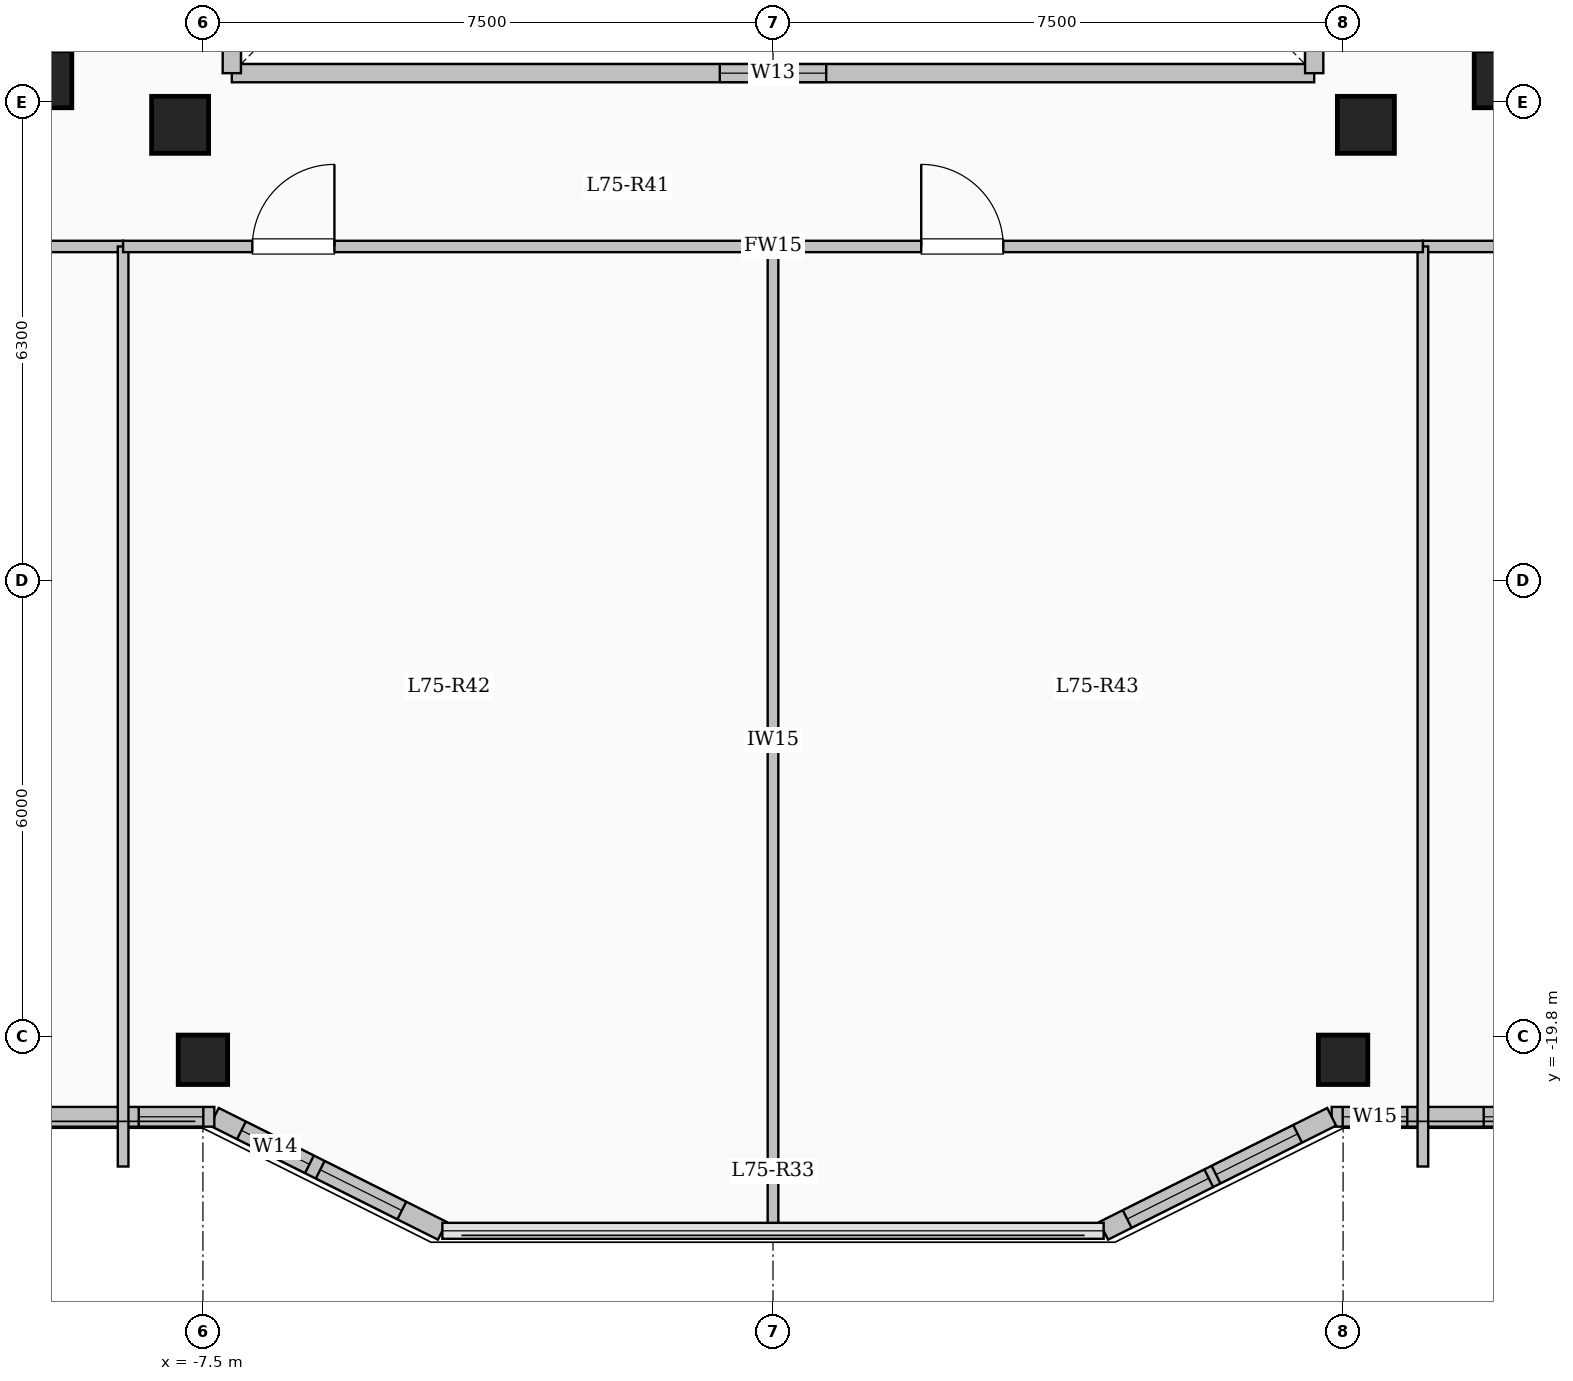
"""IFC4 building model, lengths in metres.
Left out: names, types, materials, properties, quantities, classifications, styles, units other than length and angle.
Written with IfcOpenShell. Run it as: python <this file> out.ifc"""

import sys

from ifc_helpers import new_model, si_unit, direction, frame, frame_2d, origin, origin_2d, place, context, subcontext, project, spatial, rectangle, extrude, element, fill, save


model = new_model("IFC4")
c1 = context("Model", 3, precision=1e-05, world=origin(), true_north=direction((0.0, 1.0)))
c2 = subcontext(c1, "Body", "Model", "MODEL_VIEW")
j1 = project(units=[si_unit("LENGTHUNIT", "METRE"), si_unit("PLANEANGLEUNIT", "RADIAN")], contexts=[c1])
p1 = place(None, origin())
s1 = spatial("IfcSite", under=j1, at=p1, CompositionType="ELEMENT")
p2 = place(p1, origin())
s2 = spatial("IfcBuilding", under=s1, at=p2, CompositionType="ELEMENT")
p3 = place(p2, frame((0.0, 0.0, 276.3)))
s3 = spatial("IfcBuildingStorey", under=s2, at=p3, CompositionType="ELEMENT", Elevation=276.3)
for number, where, z_axis, x_axis in (
    (1, (-7.8, -7.8, 0.0), (0.0, 0.0, 1.0), (1.0, 0.0, 0.0)),
    (2, (7.8, -7.8, 0.0), (0.0, 0.0, 1.0), (1.0, 0.0, 0.0)),
    (3, (-9.6, -7.2, 0.0), (0.0, 0.0, 1.0), (1.0, 0.0, 0.0)),
    (4, (9.6, -7.2, 0.0), (0.0, 0.0, 1.0), (1.0, 0.0, 0.0)),
):
    element("IfcColumn", number, at=place(p3, frame(where, z_axis=z_axis, x_axis=x_axis)), inside=s3, PredefinedType="COLUMN", context=c2, shape_type="SweptSolid", body=[
        extrude(rectangle(XDim=0.75, YDim=0.75, at=origin_2d()), origin(), (0.0, 0.0, 1.0), 5.25),
    ])
for number, where, z_axis, x_axis in (
    (5, (-7.5, -20.1, 0.0), (0.0, 0.0, 1.0), (1.0, 0.0, 0.0)),
    (6, (7.5, -20.1, 0.0), (0.0, 0.0, 1.0), (1.0, 0.0, 0.0)),
):
    element("IfcColumn", number, at=place(p3, frame(where, z_axis=z_axis, x_axis=x_axis)), inside=s3, PredefinedType="COLUMN", context=c2, shape_type="SweptSolid", body=[
        extrude(rectangle(XDim=0.65, YDim=0.65, at=origin_2d()), origin(), (0.0, 0.0, 1.0), 5.25),
    ])
p4 = place(p3, frame((-7.12, -7.12, 0.0), z_axis=(0.0, 0.0, 1.0), x_axis=(1.0, 0.0, 0.0)))
e7 = element("IfcWall", 7, at=p4, inside=s3, PredefinedType="SOLIDWALL", context=c2, shape_type="SweptSolid", body=[
    extrude(rectangle(XDim=14.24, YDim=0.24, at=frame_2d((7.12, 0.0))), origin(), (0.0, 0.0, 1.0), 4.95),
])
p5 = place(p4, frame((6.42, 0.0, 0.95)))
e8 = element("IfcOpeningElement", 8, at=p5, cuts=e7, PredefinedType="OPENING", context=c2, shape_type="SweptSolid", body=[
    extrude(rectangle(XDim=1.4, YDim=1.5, at=frame_2d((0.7, 0.75))), frame((0.0, 0.13, 0.0), z_axis=(0.0, -1.0, 0.0), x_axis=(1.0, 0.0, 0.0)), (0.0, 0.0, 1.0), 0.26),
])
p6 = place(p3, frame((7.12, -7.12, 0.0), z_axis=(0.0, 0.0, 1.0), x_axis=(0.0, 1.0, 0.0)))
e9 = element("IfcWall", 9, at=p6, inside=s3, PredefinedType="SOLIDWALL", context=c2, shape_type="SweptSolid", body=[
    extrude(rectangle(XDim=14.24, YDim=0.24, at=frame_2d((7.12, 0.0))), origin(), (0.0, 0.0, 1.0), 4.95),
])
p7 = place(p6, frame((6.42, 0.0, 0.95)))
e10 = element("IfcOpeningElement", 10, at=p7, cuts=e9, PredefinedType="OPENING", context=c2, shape_type="SweptSolid", body=[
    extrude(rectangle(XDim=1.4, YDim=1.5, at=frame_2d((0.7, 0.75))), frame((0.0, 0.13, 0.0), z_axis=(0.0, -1.0, 0.0), x_axis=(1.0, 0.0, 0.0)), (0.0, 0.0, 1.0), 0.26),
])
p8 = place(p3, frame((-7.12, 7.12, 0.0), z_axis=(0.0, 0.0, 1.0), x_axis=(0.0, -1.0, 0.0)))
e11 = element("IfcWall", 11, at=p8, inside=s3, PredefinedType="SOLIDWALL", context=c2, shape_type="SweptSolid", body=[
    extrude(rectangle(XDim=14.24, YDim=0.24, at=frame_2d((7.12, 0.0))), origin(), (0.0, 0.0, 1.0), 4.95),
])
p9 = place(p8, frame((6.42, 0.0, 0.95)))
e12 = element("IfcOpeningElement", 12, at=p9, cuts=e11, PredefinedType="OPENING", context=c2, shape_type="SweptSolid", body=[
    extrude(rectangle(XDim=1.4, YDim=1.5, at=frame_2d((0.7, 0.75))), frame((0.0, 0.13, 0.0), z_axis=(0.0, -1.0, 0.0), x_axis=(1.0, 0.0, 0.0)), (0.0, 0.0, 1.0), 0.26),
])
p10 = place(p3, frame((17.85, -20.85, 0.0), z_axis=(0.0, 0.0, 1.0), x_axis=(-1.0, 0.0, 0.0)))
e13 = element("IfcWall", 13, at=p10, inside=s3, PredefinedType="SOLIDWALL", context=c2, shape_type="SweptSolid", body=[
    extrude(rectangle(XDim=10.5, YDim=0.26, at=frame_2d((5.25, 0.0))), origin(), (0.0, 0.0, 1.0), 4.95),
])
p11 = place(p10, frame((1.55, 0.0, 0.85)))
e14 = element("IfcOpeningElement", 14, at=p11, cuts=e13, PredefinedType="OPENING", context=c2, shape_type="SweptSolid", body=[
    extrude(rectangle(XDim=2.3, YDim=2.2, at=frame_2d((1.15, 1.1))), frame((0.0, 0.14, 0.0), z_axis=(0.0, -1.0, 0.0), x_axis=(1.0, 0.0, 0.0)), (0.0, 0.0, 1.0), 0.28),
])
p12 = place(p10, frame((6.2, 0.0, 0.85)))
e15 = element("IfcOpeningElement", 15, at=p12, cuts=e13, PredefinedType="OPENING", context=c2, shape_type="SweptSolid", body=[
    extrude(rectangle(XDim=2.3, YDim=2.2, at=frame_2d((1.15, 1.1))), frame((0.0, 0.14, 0.0), z_axis=(0.0, -1.0, 0.0), x_axis=(1.0, 0.0, 0.0)), (0.0, 0.0, 1.0), 0.28),
])
p13 = place(p10, frame((9.505, 0.0, 0.95)))
e16 = element("IfcOpeningElement", 16, at=p13, cuts=e13, PredefinedType="OPENING", context=c2, shape_type="SweptSolid", body=[
    extrude(rectangle(XDim=0.85, YDim=1.5, at=frame_2d((0.425, 0.75))), frame((0.0, 0.14, 0.0), z_axis=(0.0, -1.0, 0.0), x_axis=(1.0, 0.0, 0.0)), (0.0, 0.0, 1.0), 0.28),
])
p14 = place(p3, frame((7.35, -20.85, 0.0), z_axis=(0.0, 0.0, 1.0), x_axis=(-0.894427191, -0.4472135955, 0.0)))
e17 = element("IfcWall", 17, at=p14, inside=s3, PredefinedType="SOLIDWALL", context=c2, shape_type="SweptSolid", body=[
    extrude(rectangle(XDim=3.354, YDim=0.26, at=frame_2d((1.677, 0.0))), origin(), (0.0, 0.0, 1.0), 4.95),
])
p15 = place(p14, frame((0.501, 0.0, 0.95)))
e18 = element("IfcOpeningElement", 18, at=p15, cuts=e17, PredefinedType="OPENING", context=c2, shape_type="SweptSolid", body=[
    extrude(rectangle(XDim=1.2, YDim=1.5, at=frame_2d((0.6, 0.75))), frame((0.0, 0.14, 0.0), z_axis=(0.0, -1.0, 0.0), x_axis=(1.0, 0.0, 0.0)), (0.0, 0.0, 1.0), 0.28),
])
p16 = place(p14, frame((1.808, 0.0, 0.95)))
e19 = element("IfcOpeningElement", 19, at=p16, cuts=e17, PredefinedType="OPENING", context=c2, shape_type="SweptSolid", body=[
    extrude(rectangle(XDim=1.2, YDim=1.5, at=frame_2d((0.6, 0.75))), frame((0.0, 0.14, 0.0), z_axis=(0.0, -1.0, 0.0), x_axis=(1.0, 0.0, 0.0)), (0.0, 0.0, 1.0), 0.28),
])
p17 = place(p3, frame((-4.35, -22.35, 0.0), z_axis=(0.0, 0.0, 1.0), x_axis=(-0.894427191, 0.4472135955, 0.0)))
e20 = element("IfcWall", 20, at=p17, inside=s3, PredefinedType="SOLIDWALL", context=c2, shape_type="SweptSolid", body=[
    extrude(rectangle(XDim=3.354, YDim=0.26, at=frame_2d((1.677, 0.0))), origin(), (0.0, 0.0, 1.0), 4.95),
])
p18 = place(p17, frame((0.596, 0.0, 0.95)))
e21 = element("IfcOpeningElement", 21, at=p18, cuts=e20, PredefinedType="OPENING", context=c2, shape_type="SweptSolid", body=[
    extrude(rectangle(XDim=1.2, YDim=1.5, at=frame_2d((0.6, 0.75))), frame((0.0, 0.14, 0.0), z_axis=(0.0, -1.0, 0.0), x_axis=(1.0, 0.0, 0.0)), (0.0, 0.0, 1.0), 0.28),
])
p19 = place(p17, frame((1.955, 0.0, 0.95)))
e22 = element("IfcOpeningElement", 22, at=p19, cuts=e20, PredefinedType="OPENING", context=c2, shape_type="SweptSolid", body=[
    extrude(rectangle(XDim=1.0, YDim=1.5, at=frame_2d((0.5, 0.75))), frame((0.0, 0.14, 0.0), z_axis=(0.0, -1.0, 0.0), x_axis=(1.0, 0.0, 0.0)), (0.0, 0.0, 1.0), 0.28),
])
p20 = place(p3, frame((-7.35, -20.85, 0.0), z_axis=(0.0, 0.0, 1.0), x_axis=(-1.0, 0.0, 0.0)))
e23 = element("IfcWall", 23, at=p20, inside=s3, PredefinedType="SOLIDWALL", context=c2, shape_type="SweptSolid", body=[
    extrude(rectangle(XDim=10.5, YDim=0.26, at=frame_2d((5.25, 0.0))), origin(), (0.0, 0.0, 1.0), 4.95),
])
p21 = place(p20, frame((0.145, 0.0, 0.95)))
e24 = element("IfcOpeningElement", 24, at=p21, cuts=e23, PredefinedType="OPENING", context=c2, shape_type="SweptSolid", body=[
    extrude(rectangle(XDim=0.85, YDim=1.5, at=frame_2d((0.425, 0.75))), frame((0.0, 0.14, 0.0), z_axis=(0.0, -1.0, 0.0), x_axis=(1.0, 0.0, 0.0)), (0.0, 0.0, 1.0), 0.28),
])
p22 = place(p20, frame((2.65, 0.0, 0.85)))
e25 = element("IfcOpeningElement", 25, at=p22, cuts=e23, PredefinedType="OPENING", context=c2, shape_type="SweptSolid", body=[
    extrude(rectangle(XDim=2.3, YDim=2.2, at=frame_2d((1.15, 1.1))), frame((0.0, 0.14, 0.0), z_axis=(0.0, -1.0, 0.0), x_axis=(1.0, 0.0, 0.0)), (0.0, 0.0, 1.0), 0.28),
])
p23 = place(p20, frame((7.275, 0.0, 0.85)))
e26 = element("IfcOpeningElement", 26, at=p23, cuts=e23, PredefinedType="OPENING", context=c2, shape_type="SweptSolid", body=[
    extrude(rectangle(XDim=2.3, YDim=2.2, at=frame_2d((1.15, 1.1))), frame((0.0, 0.14, 0.0), z_axis=(0.0, -1.0, 0.0), x_axis=(1.0, 0.0, 0.0)), (0.0, 0.0, 1.0), 0.28),
])
p24 = place(p3, frame((-17.75, -9.4, 0.0), z_axis=(0.0, 0.0, 1.0), x_axis=(1.0, 0.0, 0.0)))
e27 = element("IfcWall", 27, at=p24, inside=s3, PredefinedType="PARTITIONING", context=c2, shape_type="SweptSolid", body=[
    extrude(rectangle(XDim=9.2, YDim=0.15, at=frame_2d((4.6, 0.0))), origin(), (0.0, 0.0, 1.0), 4.95),
])
p25 = place(p24, frame((1.1, 0.0, 0.0)))
e28 = element("IfcOpeningElement", 28, at=p25, cuts=e27, PredefinedType="OPENING", context=c2, shape_type="SweptSolid", body=[
    extrude(rectangle(XDim=1.08, YDim=2.15, at=frame_2d((0.54, 1.075))), frame((0.0, 0.085, 0.0), z_axis=(0.0, -1.0, 0.0), x_axis=(1.0, 0.0, 0.0)), (0.0, 0.0, 1.0), 0.17),
])
p26 = place(p24, frame((4.926, 0.0, 0.0)))
e29 = element("IfcOpeningElement", 29, at=p26, cuts=e27, PredefinedType="OPENING", context=c2, shape_type="SweptSolid", body=[
    extrude(rectangle(XDim=1.08, YDim=2.15, at=frame_2d((0.54, 1.075))), frame((0.0, 0.085, 0.0), z_axis=(0.0, -1.0, 0.0), x_axis=(1.0, 0.0, 0.0)), (0.0, 0.0, 1.0), 0.17),
])
p27 = place(p3, frame((8.55, -9.4, 0.0), z_axis=(0.0, 0.0, 1.0), x_axis=(1.0, 0.0, 0.0)))
e30 = element("IfcWall", 30, at=p27, inside=s3, PredefinedType="PARTITIONING", context=c2, shape_type="SweptSolid", body=[
    extrude(rectangle(XDim=9.2, YDim=0.15, at=frame_2d((4.6, 0.0))), origin(), (0.0, 0.0, 1.0), 4.95),
])
p28 = place(p27, frame((1.1, 0.0, 0.0)))
e31 = element("IfcOpeningElement", 31, at=p28, cuts=e30, PredefinedType="OPENING", context=c2, shape_type="SweptSolid", body=[
    extrude(rectangle(XDim=1.08, YDim=2.15, at=frame_2d((0.54, 1.075))), frame((0.0, 0.085, 0.0), z_axis=(0.0, -1.0, 0.0), x_axis=(1.0, 0.0, 0.0)), (0.0, 0.0, 1.0), 0.17),
])
p29 = place(p27, frame((4.893, 0.0, 0.0)))
e32 = element("IfcOpeningElement", 32, at=p29, cuts=e30, PredefinedType="OPENING", context=c2, shape_type="SweptSolid", body=[
    extrude(rectangle(XDim=1.2, YDim=2.15, at=frame_2d((0.6, 1.075))), frame((0.0, 0.085, 0.0), z_axis=(0.0, -1.0, 0.0), x_axis=(1.0, 0.0, 0.0)), (0.0, 0.0, 1.0), 0.17),
])
for number, where, z_axis, x_axis in (
    (33, (-8.55, -21.504, 0.0), (0.0, 0.0, 1.0), (0.0, 1.0, 0.0)),
    (34, (8.55, -21.504, 0.0), (0.0, 0.0, 1.0), (0.0, 1.0, 0.0)),
):
    element("IfcWall", number, at=place(p3, frame(where, z_axis=z_axis, x_axis=x_axis)), inside=s3, PredefinedType="PARTITIONING", context=c2, shape_type="SweptSolid", body=[
        extrude(rectangle(XDim=12.104, YDim=0.14, at=frame_2d((6.052, 0.0))), origin(), (0.0, 0.0, 1.0), 4.95),
    ])
p30 = place(p3, frame((-8.55, -9.4, 0.0), z_axis=(0.0, 0.0, 1.0), x_axis=(1.0, 0.0, 0.0)))
e35 = element("IfcWall", 35, at=p30, inside=s3, PredefinedType="PARTITIONING", context=c2, shape_type="SweptSolid", body=[
    extrude(rectangle(XDim=17.1, YDim=0.15, at=frame_2d((8.55, 0.0))), origin(), (0.0, 0.0, 1.0), 4.95),
])
p31 = place(p30, frame((1.7, 0.0, 0.0)))
e36 = element("IfcOpeningElement", 36, at=p31, cuts=e35, PredefinedType="OPENING", context=c2, shape_type="SweptSolid", body=[
    extrude(rectangle(XDim=1.08, YDim=2.15, at=frame_2d((0.54, 1.075))), frame((0.0, 0.085, 0.0), z_axis=(0.0, -1.0, 0.0), x_axis=(1.0, 0.0, 0.0)), (0.0, 0.0, 1.0), 0.17),
])
p32 = place(p30, frame((10.5, 0.0, 0.0)))
e37 = element("IfcOpeningElement", 37, at=p32, cuts=e35, PredefinedType="OPENING", context=c2, shape_type="SweptSolid", body=[
    extrude(rectangle(XDim=1.08, YDim=2.15, at=frame_2d((0.54, 1.075))), frame((0.0, 0.085, 0.0), z_axis=(0.0, -1.0, 0.0), x_axis=(1.0, 0.0, 0.0)), (0.0, 0.0, 1.0), 0.17),
])
p33 = place(p3, frame((0.0, -22.38, 0.0), z_axis=(0.0, 0.0, 1.0), x_axis=(0.0, 1.0, 0.0)))
e38 = element("IfcWall", 38, at=p33, inside=s3, PredefinedType="PARTITIONING", context=c2, shape_type="SweptSolid", body=[
    extrude(rectangle(XDim=12.98, YDim=0.14, at=frame_2d((6.49, 0.0))), origin(), (0.0, 0.0, 1.0), 4.95),
])
p34 = place(p5, origin())
e39 = element("IfcWindow", 39, at=p34, inside=s3, PartitioningType="SINGLE_PANEL", PredefinedType="WINDOW", context=c2, shape_type="SweptSolid", body=[
    extrude(rectangle(XDim=1.4, YDim=1.5, at=frame_2d((0.7, 0.75))), frame((0.0, 0.03, 0.0), z_axis=(0.0, -1.0, 0.0), x_axis=(1.0, 0.0, 0.0)), (0.0, 0.0, 1.0), 0.06),
])
fill(e8, e39)
p35 = place(p12, origin())
e40 = element("IfcWindow", 40, at=p35, inside=s3, PartitioningType="SINGLE_PANEL", PredefinedType="WINDOW", context=c2, shape_type="SweptSolid", body=[
    extrude(rectangle(XDim=2.3, YDim=2.2, at=frame_2d((1.15, 1.1))), frame((0.0, 0.03, 0.0), z_axis=(0.0, -1.0, 0.0), x_axis=(1.0, 0.0, 0.0)), (0.0, 0.0, 1.0), 0.06),
])
fill(e15, e40)
p36 = place(p13, origin())
e41 = element("IfcWindow", 41, at=p36, inside=s3, PartitioningType="SINGLE_PANEL", PredefinedType="WINDOW", context=c2, shape_type="SweptSolid", body=[
    extrude(rectangle(XDim=0.85, YDim=1.5, at=frame_2d((0.425, 0.75))), frame((0.0, 0.03, 0.0), z_axis=(0.0, -1.0, 0.0), x_axis=(1.0, 0.0, 0.0)), (0.0, 0.0, 1.0), 0.06),
])
fill(e16, e41)
p37 = place(p15, origin())
e42 = element("IfcWindow", 42, at=p37, inside=s3, PartitioningType="SINGLE_PANEL", PredefinedType="WINDOW", context=c2, shape_type="SweptSolid", body=[
    extrude(rectangle(XDim=1.2, YDim=1.5, at=frame_2d((0.6, 0.75))), frame((0.0, 0.03, 0.0), z_axis=(0.0, -1.0, 0.0), x_axis=(1.0, 0.0, 0.0)), (0.0, 0.0, 1.0), 0.06),
])
fill(e18, e42)
p38 = place(p16, origin())
e43 = element("IfcWindow", 43, at=p38, inside=s3, PartitioningType="SINGLE_PANEL", PredefinedType="WINDOW", context=c2, shape_type="SweptSolid", body=[
    extrude(rectangle(XDim=1.2, YDim=1.5, at=frame_2d((0.6, 0.75))), frame((0.0, 0.03, 0.0), z_axis=(0.0, -1.0, 0.0), x_axis=(1.0, 0.0, 0.0)), (0.0, 0.0, 1.0), 0.06),
])
fill(e19, e43)
p39 = place(p18, origin())
e44 = element("IfcWindow", 44, at=p39, inside=s3, PartitioningType="SINGLE_PANEL", PredefinedType="WINDOW", context=c2, shape_type="SweptSolid", body=[
    extrude(rectangle(XDim=1.2, YDim=1.5, at=frame_2d((0.6, 0.75))), frame((0.0, 0.03, 0.0), z_axis=(0.0, -1.0, 0.0), x_axis=(1.0, 0.0, 0.0)), (0.0, 0.0, 1.0), 0.06),
])
fill(e21, e44)
p40 = place(p19, origin())
e45 = element("IfcWindow", 45, at=p40, inside=s3, PartitioningType="SINGLE_PANEL", PredefinedType="WINDOW", context=c2, shape_type="SweptSolid", body=[
    extrude(rectangle(XDim=1.0, YDim=1.5, at=frame_2d((0.5, 0.75))), frame((0.0, 0.03, 0.0), z_axis=(0.0, -1.0, 0.0), x_axis=(1.0, 0.0, 0.0)), (0.0, 0.0, 1.0), 0.06),
])
fill(e22, e45)
p41 = place(p21, origin())
e46 = element("IfcWindow", 46, at=p41, inside=s3, PartitioningType="SINGLE_PANEL", PredefinedType="WINDOW", context=c2, shape_type="SweptSolid", body=[
    extrude(rectangle(XDim=0.85, YDim=1.5, at=frame_2d((0.425, 0.75))), frame((0.0, 0.03, 0.0), z_axis=(0.0, -1.0, 0.0), x_axis=(1.0, 0.0, 0.0)), (0.0, 0.0, 1.0), 0.06),
])
fill(e24, e46)
p42 = place(p31, origin())
e47 = element("IfcDoor", 47, at=p42, inside=s3, OperationType="SINGLE_SWING_RIGHT", PredefinedType="DOOR", context=c2, shape_type="SweptSolid", body=[
    extrude(rectangle(XDim=1.08, YDim=2.15, at=frame_2d((0.54, 1.075))), frame((0.0, 0.025, 0.0), z_axis=(0.0, -1.0, 0.0), x_axis=(1.0, 0.0, 0.0)), (0.0, 0.0, 1.0), 0.05),
])
fill(e36, e47)
p43 = place(p32, origin())
e48 = element("IfcDoor", 48, at=p43, inside=s3, OperationType="SINGLE_SWING_LEFT", PredefinedType="DOOR", context=c2, shape_type="SweptSolid", body=[
    extrude(rectangle(XDim=1.08, YDim=2.15, at=frame_2d((0.54, 1.075))), frame((0.0, 0.025, 0.0), z_axis=(0.0, -1.0, 0.0), x_axis=(1.0, 0.0, 0.0)), (0.0, 0.0, 1.0), 0.05),
])
fill(e37, e48)
save(model, sys.argv[1])
